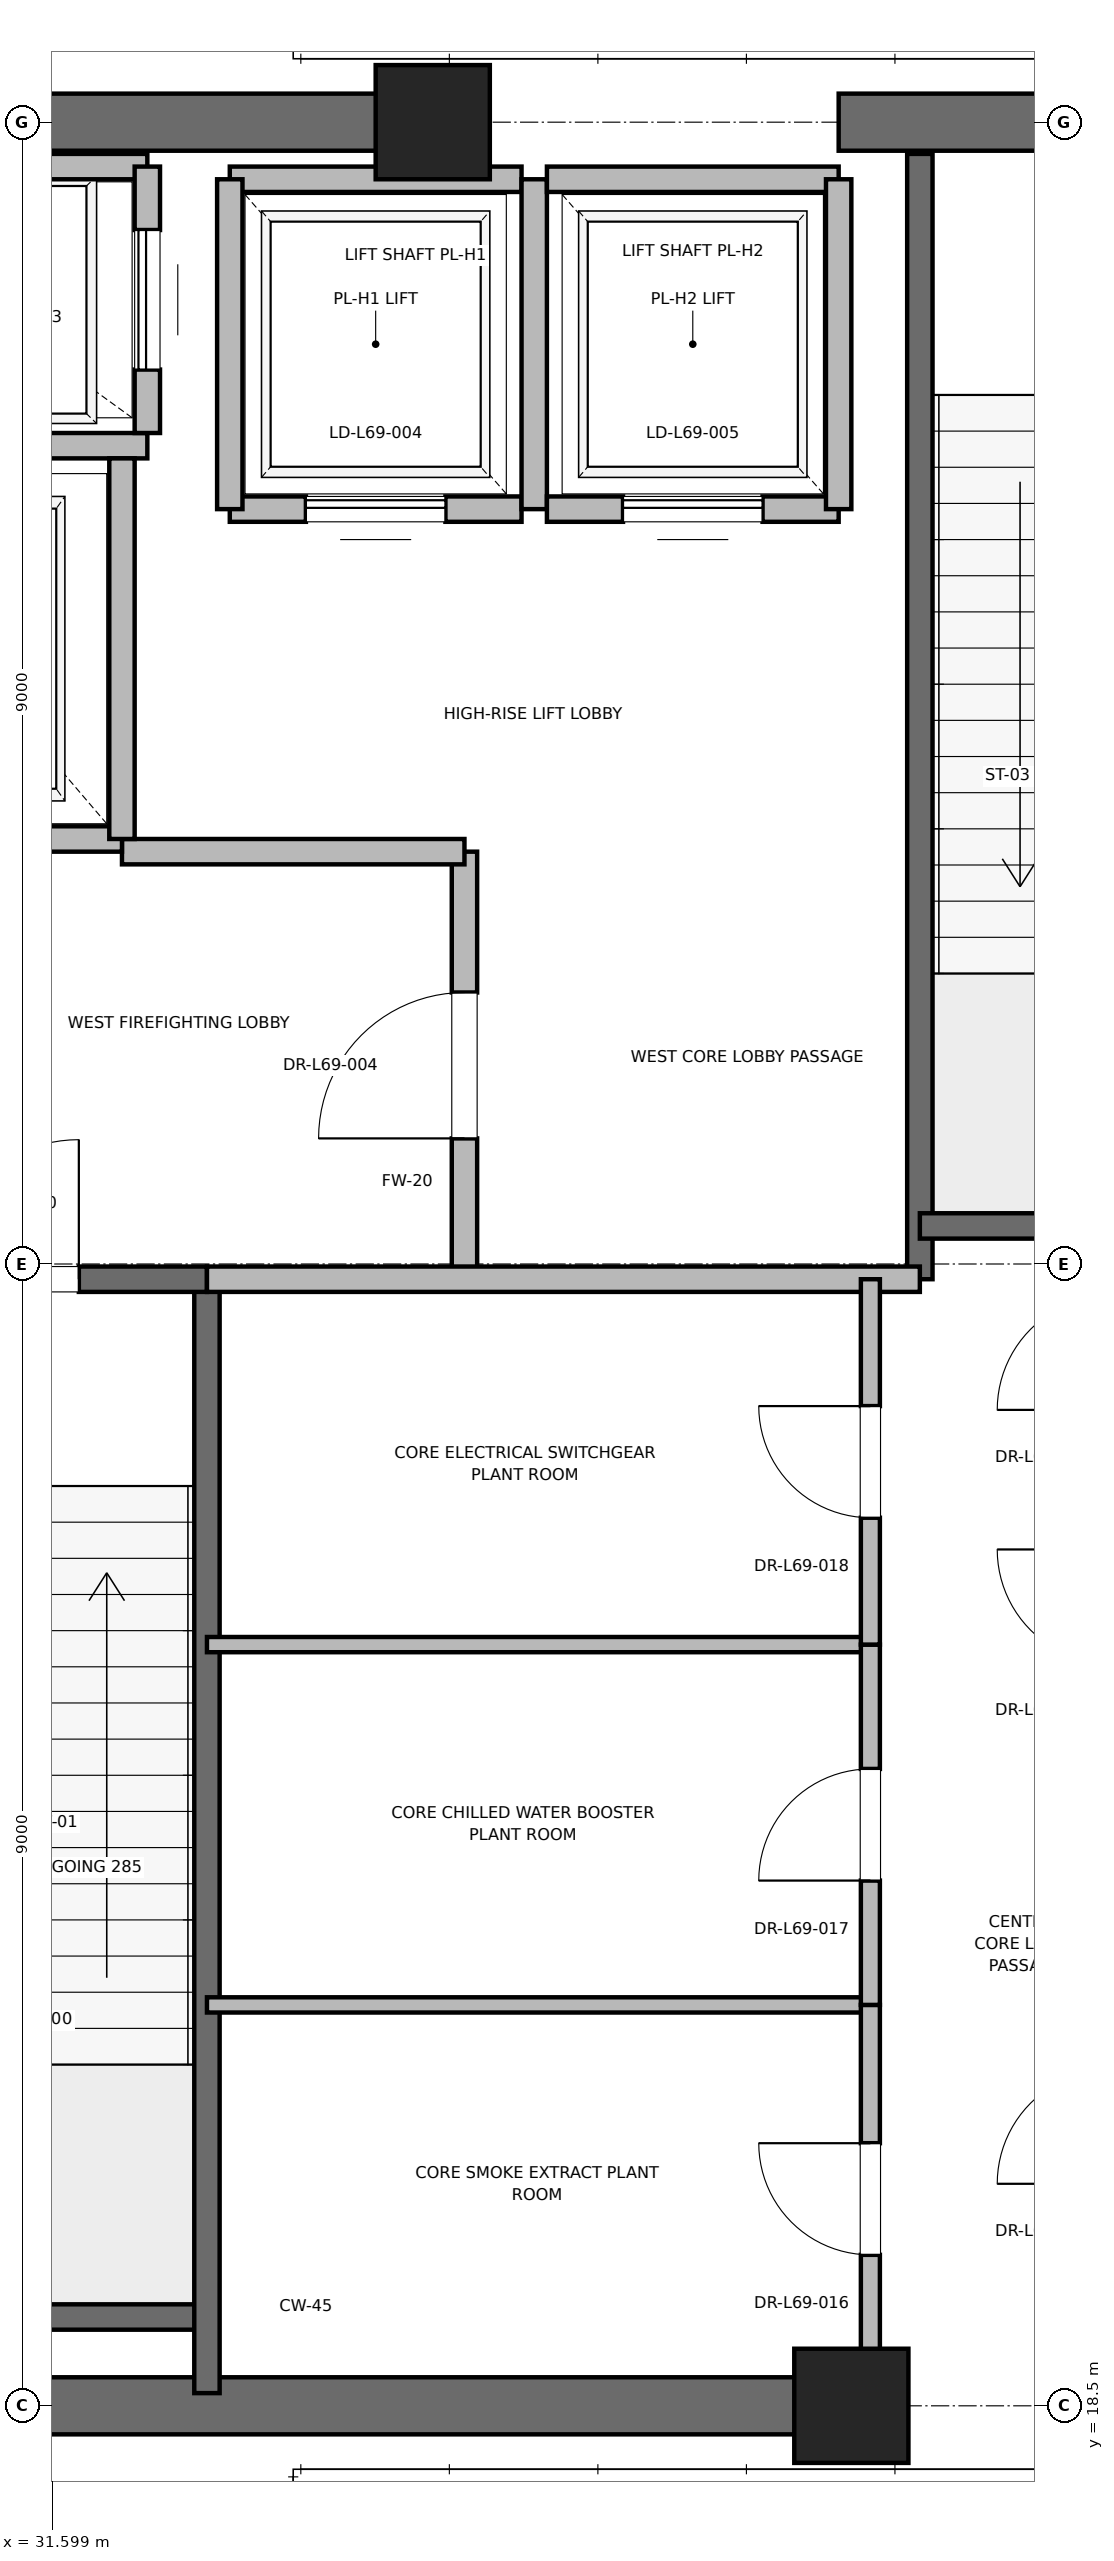
"""IFC4 building model, lengths in metres.
Left out: names, types, materials, properties, quantities, classifications, styles, units other than length and angle.
Written with IfcOpenShell. Run it as: python <this file> out.ifc"""

import sys

from ifc_helpers import new_model, si_unit, direction, frame, frame_2d, origin, origin_2d, place, context, subcontext, project, spatial, rectangle, extrude, element, fill, save


model = new_model("IFC4")
c1 = context("Model", 3, precision=1e-05, world=origin(), true_north=direction((0.0, 1.0)))
c2 = subcontext(c1, "Body", "Model", "MODEL_VIEW")
j1 = project(units=[si_unit("LENGTHUNIT", "METRE"), si_unit("PLANEANGLEUNIT", "RADIAN")], contexts=[c1])
p1 = place(None, origin())
s1 = spatial("IfcSite", under=j1, at=p1, CompositionType="ELEMENT")
p2 = place(p1, origin())
s2 = spatial("IfcBuilding", under=s1, at=p2, CompositionType="ELEMENT")
p3 = place(p2, frame((0.0, 0.0, 295.2)))
s3 = spatial("IfcBuildingStorey", under=s2, at=p3, CompositionType="ELEMENT", Elevation=295.2)
for number, where, z_axis, x_axis in (
    (1, (37.9, 18.5, 0.0), (0.0, 0.0, 1.0), (1.0, 0.0, 0.0)),
    (2, (34.6, 36.5, 0.0), (0.0, 0.0, 1.0), (1.0, 0.0, 0.0)),
):
    element("IfcColumn", number, at=place(p3, frame(where, z_axis=z_axis, x_axis=x_axis)), inside=s3, PredefinedType="PILASTER", context=c2, shape_type="SweptSolid", body=[
        extrude(rectangle(XDim=0.9, YDim=0.9, at=origin_2d()), origin(), (0.0, 0.0, 1.0), 5.8),
    ])
p4 = place(p3, frame((29.0, 18.5, 0.0), z_axis=(0.0, 0.0, 1.0), x_axis=(1.0, 0.0, 0.0)))
e3 = element("IfcWall", 3, at=p4, inside=s3, PredefinedType="SHEAR", context=c2, shape_type="SweptSolid", body=[
    extrude(rectangle(XDim=9.2, YDim=0.45, at=frame_2d((4.6, 0.0))), origin(), (0.0, 0.0, 1.0), 5.5),
])
p5 = place(p3, frame((29.0, 36.5, 0.0), z_axis=(0.0, 0.0, 1.0), x_axis=(1.0, 0.0, 0.0)))
e4 = element("IfcWall", 4, at=p5, inside=s3, PredefinedType="SHEAR", context=c2, shape_type="SweptSolid", body=[
    extrude(rectangle(XDim=5.8, YDim=0.45, at=frame_2d((2.9, 0.0))), origin(), (0.0, 0.0, 1.0), 5.5),
])
p6 = place(p3, frame((37.8, 36.5, 0.0), z_axis=(0.0, 0.0, 1.0), x_axis=(1.0, 0.0, 0.0)))
e5 = element("IfcWall", 5, at=p6, inside=s3, PredefinedType="SHEAR", context=c2, shape_type="SweptSolid", body=[
    extrude(rectangle(XDim=4.4, YDim=0.45, at=frame_2d((2.2, 0.0))), origin(), (0.0, 0.0, 1.0), 5.5),
])
p7 = place(p6, frame((1.65, 0.0, 0.0)))
e6 = element("IfcOpeningElement", 6, at=p7, cuts=e5, PredefinedType="OPENING", context=c2, shape_type="SweptSolid", body=[
    extrude(rectangle(XDim=1.1, YDim=2.15, at=frame_2d((0.55, 1.075))), frame((0.0, 0.225, 0.0), z_axis=(0.0, -1.0, 0.0), x_axis=(1.0, 0.0, 0.0)), (0.0, 0.0, 1.0), 0.45),
])
p8 = place(p3, frame((29.7, 19.2, 0.0), z_axis=(0.0, 0.0, 1.0), x_axis=(1.0, 0.0, 0.0)))
e7 = element("IfcWall", 7, at=p8, inside=s3, PredefinedType="SOLIDWALL", context=c2, shape_type="SweptSolid", body=[
    extrude(rectangle(XDim=3.12, YDim=0.2, at=frame_2d((1.56, 0.0))), origin(), (0.0, 0.0, 1.0), 5.5),
])
p9 = place(p3, frame((32.82, 18.6, 0.0), z_axis=(0.0, 0.0, 1.0), x_axis=(0.0, 1.0, 0.0)))
e8 = element("IfcWall", 8, at=p9, inside=s3, PredefinedType="SOLIDWALL", context=c2, shape_type="SweptSolid", body=[
    extrude(rectangle(XDim=8.78, YDim=0.2, at=frame_2d((4.39, 0.0))), origin(), (0.0, 0.0, 1.0), 5.5),
])
p10 = place(p3, frame((29.7, 27.38, 0.0), z_axis=(0.0, 0.0, 1.0), x_axis=(1.0, 0.0, 0.0)))
e9 = element("IfcWall", 9, at=p10, inside=s3, PredefinedType="SOLIDWALL", context=c2, shape_type="SweptSolid", body=[
    extrude(rectangle(XDim=3.12, YDim=0.2, at=frame_2d((1.56, 0.0))), origin(), (0.0, 0.0, 1.0), 5.5),
])
p11 = place(p10, frame((1.01, 0.0, 0.0)))
e10 = element("IfcOpeningElement", 10, at=p11, cuts=e9, PredefinedType="OPENING", context=c2, shape_type="SweptSolid", body=[
    extrude(rectangle(XDim=1.1, YDim=2.15, at=frame_2d((0.55, 1.075))), frame((0.0, 0.1, 0.0), z_axis=(0.0, -1.0, 0.0), x_axis=(1.0, 0.0, 0.0)), (0.0, 0.0, 1.0), 0.2),
])
p12 = place(p3, frame((38.44, 27.38, 0.0), z_axis=(0.0, 0.0, 1.0), x_axis=(0.0, 1.0, 0.0)))
e11 = element("IfcWall", 11, at=p12, inside=s3, PredefinedType="SOLIDWALL", context=c2, shape_type="SweptSolid", body=[
    extrude(rectangle(XDim=8.87, YDim=0.2, at=frame_2d((4.435, 0.0))), origin(), (0.0, 0.0, 1.0), 5.5),
])
p13 = place(p3, frame((38.44, 27.8, 0.0), z_axis=(0.0, 0.0, 1.0), x_axis=(1.0, 0.0, 0.0)))
e12 = element("IfcWall", 12, at=p13, inside=s3, PredefinedType="SOLIDWALL", context=c2, shape_type="SweptSolid", body=[
    extrude(rectangle(XDim=3.32, YDim=0.2, at=frame_2d((1.66, 0.0))), origin(), (0.0, 0.0, 1.0), 5.5),
])
p14 = place(p3, frame((34.85, 27.38, 0.0), z_axis=(0.0, 0.0, 1.0), x_axis=(0.0, 1.0, 0.0)))
e13 = element("IfcWall", 13, at=p14, inside=s3, PredefinedType="PARTITIONING", context=c2, shape_type="SweptSolid", body=[
    extrude(rectangle(XDim=3.37, YDim=0.2, at=frame_2d((1.685, 0.0))), origin(), (0.0, 0.0, 1.0), 5.5),
])
p15 = place(p14, frame((1.11, 0.0, 0.0)))
e14 = element("IfcOpeningElement", 14, at=p15, cuts=e13, PredefinedType="OPENING", context=c2, shape_type="SweptSolid", body=[
    extrude(rectangle(XDim=1.15, YDim=2.2, at=frame_2d((0.575, 1.1))), frame((0.0, 0.1, 0.0), z_axis=(0.0, -1.0, 0.0), x_axis=(1.0, 0.0, 0.0)), (0.0, 0.0, 1.0), 0.2),
])
p16 = place(p3, frame((32.82, 27.38, 0.0), z_axis=(0.0, 0.0, 1.0), x_axis=(1.0, 0.0, 0.0)))
e15 = element("IfcWall", 15, at=p16, inside=s3, PredefinedType="PARTITIONING", context=c2, shape_type="SweptSolid", body=[
    extrude(rectangle(XDim=5.62, YDim=0.2, at=frame_2d((2.81, 0.0))), origin(), (0.0, 0.0, 1.0), 5.5),
])
p17 = place(p3, frame((32.15, 30.75, 0.0), z_axis=(0.0, 0.0, 1.0), x_axis=(1.0, 0.0, 0.0)))
e16 = element("IfcWall", 16, at=p17, inside=s3, PredefinedType="PARTITIONING", context=c2, shape_type="SweptSolid", body=[
    extrude(rectangle(XDim=2.7, YDim=0.2, at=frame_2d((1.35, 0.0))), origin(), (0.0, 0.0, 1.0), 5.5),
])
p18 = place(p3, frame((29.55, 30.85, 0.0), z_axis=(0.0, 0.0, 1.0), x_axis=(1.0, 0.0, 0.0)))
e17 = element("IfcWall", 17, at=p18, inside=s3, PredefinedType="SOLIDWALL", context=c2, shape_type="SweptSolid", body=[
    extrude(rectangle(XDim=2.6, YDim=0.2, at=frame_2d((1.3, 0.0))), origin(), (0.0, 0.0, 1.0), 4.58),
])
p19 = place(p18, frame((0.75, 0.0, 0.0)))
e18 = element("IfcOpeningElement", 18, at=p19, cuts=e17, PredefinedType="OPENING", context=c2, shape_type="SweptSolid", body=[
    extrude(rectangle(XDim=1.1, YDim=2.2, at=frame_2d((0.55, 1.1))), frame((0.0, 0.1, 0.0), z_axis=(0.0, -1.0, 0.0), x_axis=(1.0, 0.0, 0.0)), (0.0, 0.0, 1.0), 0.2),
])
p20 = place(p3, frame((29.55, 33.95, 0.0), z_axis=(0.0, 0.0, 1.0), x_axis=(1.0, 0.0, 0.0)))
e19 = element("IfcWall", 19, at=p20, inside=s3, PredefinedType="SOLIDWALL", context=c2, shape_type="SweptSolid", body=[
    extrude(rectangle(XDim=2.8, YDim=0.2, at=frame_2d((1.4, 0.0))), origin(), (0.0, 0.0, 1.0), 5.5),
])
p21 = place(p3, frame((32.15, 30.85, 0.0), z_axis=(0.0, 0.0, 1.0), x_axis=(0.0, 1.0, 0.0)))
e20 = element("IfcWall", 20, at=p21, inside=s3, PredefinedType="SOLIDWALL", context=c2, shape_type="SweptSolid", body=[
    extrude(rectangle(XDim=3.0, YDim=0.2, at=frame_2d((1.5, 0.0))), origin(), (0.0, 0.0, 1.0), 5.5),
])
p22 = place(p3, frame((32.35, 36.15, 0.0), z_axis=(0.0, 0.0, 1.0), x_axis=(-1.0, 0.0, 0.0)))
e21 = element("IfcWall", 21, at=p22, inside=s3, PredefinedType="SOLIDWALL", context=c2, shape_type="SweptSolid", body=[
    extrude(rectangle(XDim=2.8, YDim=0.2, at=frame_2d((1.4, 0.0))), origin(), (0.0, 0.0, 1.0), 4.553),
])
p23 = place(p3, frame((32.35, 34.05, 0.0), z_axis=(0.0, 0.0, 1.0), x_axis=(0.0, 1.0, 0.0)))
e22 = element("IfcWall", 22, at=p23, inside=s3, PredefinedType="SOLIDWALL", context=c2, shape_type="SweptSolid", body=[
    extrude(rectangle(XDim=2.1, YDim=0.2, at=frame_2d((1.05, 0.0))), origin(), (0.0, 0.0, 1.0), 5.5),
])
p24 = place(p23, frame((0.5, 0.0, 0.0)))
e23 = element("IfcOpeningElement", 23, at=p24, cuts=e22, PredefinedType="OPENING", context=c2, shape_type="SweptSolid", body=[
    extrude(rectangle(XDim=1.1, YDim=2.2, at=frame_2d((0.55, 1.1))), frame((0.0, 0.1, 0.0), z_axis=(0.0, -1.0, 0.0), x_axis=(1.0, 0.0, 0.0)), (0.0, 0.0, 1.0), 0.2),
])
p25 = place(p3, frame((33.0, 33.45, 0.0), z_axis=(0.0, 0.0, 1.0), x_axis=(1.0, 0.0, 0.0)))
e24 = element("IfcWall", 24, at=p25, inside=s3, PredefinedType="SOLIDWALL", context=c2, shape_type="SweptSolid", body=[
    extrude(rectangle(XDim=2.3, YDim=0.2, at=frame_2d((1.15, 0.0))), origin(), (0.0, 0.0, 1.0), 5.5),
])
p26 = place(p25, frame((0.6, 0.0, 0.0)))
e25 = element("IfcOpeningElement", 25, at=p26, cuts=e24, PredefinedType="OPENING", context=c2, shape_type="SweptSolid", body=[
    extrude(rectangle(XDim=1.1, YDim=2.2, at=frame_2d((0.55, 1.1))), frame((0.0, 0.1, 0.0), z_axis=(0.0, -1.0, 0.0), x_axis=(1.0, 0.0, 0.0)), (0.0, 0.0, 1.0), 0.2),
])
p27 = place(p3, frame((35.3, 36.05, 0.0), z_axis=(0.0, 0.0, 1.0), x_axis=(-1.0, 0.0, 0.0)))
e26 = element("IfcWall", 26, at=p27, inside=s3, PredefinedType="SOLIDWALL", context=c2, shape_type="SweptSolid", body=[
    extrude(rectangle(XDim=2.3, YDim=0.2, at=frame_2d((1.15, 0.0))), origin(), (0.0, 0.0, 1.0), 4.58),
])
p28 = place(p3, frame((33.0, 36.05, 0.0), z_axis=(0.0, 0.0, 1.0), x_axis=(0.0, -1.0, 0.0)))
e27 = element("IfcWall", 27, at=p28, inside=s3, PredefinedType="SOLIDWALL", context=c2, shape_type="SweptSolid", body=[
    extrude(rectangle(XDim=2.6, YDim=0.2, at=frame_2d((1.3, 0.0))), origin(), (0.0, 0.0, 1.0), 5.5),
])
p29 = place(p3, frame((35.4, 33.45, 0.0), z_axis=(0.0, 0.0, 1.0), x_axis=(0.0, 1.0, 0.0)))
e28 = element("IfcWall", 28, at=p29, inside=s3, PredefinedType="SOLIDWALL", context=c2, shape_type="SweptSolid", body=[
    extrude(rectangle(XDim=2.6, YDim=0.2, at=frame_2d((1.3, 0.0))), origin(), (0.0, 0.0, 1.0), 4.58),
])
p30 = place(p3, frame((35.5, 33.45, 0.0), z_axis=(0.0, 0.0, 1.0), x_axis=(1.0, 0.0, 0.0)))
e29 = element("IfcWall", 29, at=p30, inside=s3, PredefinedType="SOLIDWALL", context=c2, shape_type="SweptSolid", body=[
    extrude(rectangle(XDim=2.3, YDim=0.2, at=frame_2d((1.15, 0.0))), origin(), (0.0, 0.0, 1.0), 5.5),
])
p31 = place(p30, frame((0.6, 0.0, 0.0)))
e30 = element("IfcOpeningElement", 30, at=p31, cuts=e29, PredefinedType="OPENING", context=c2, shape_type="SweptSolid", body=[
    extrude(rectangle(XDim=1.1, YDim=2.2, at=frame_2d((0.55, 1.1))), frame((0.0, 0.1, 0.0), z_axis=(0.0, -1.0, 0.0), x_axis=(1.0, 0.0, 0.0)), (0.0, 0.0, 1.0), 0.2),
])
p32 = place(p3, frame((37.8, 36.05, 0.0), z_axis=(0.0, 0.0, 1.0), x_axis=(-1.0, 0.0, 0.0)))
e31 = element("IfcWall", 31, at=p32, inside=s3, PredefinedType="SOLIDWALL", context=c2, shape_type="SweptSolid", body=[
    extrude(rectangle(XDim=2.3, YDim=0.2, at=frame_2d((1.15, 0.0))), origin(), (0.0, 0.0, 1.0), 4.58),
])
p33 = place(p3, frame((37.8, 33.45, 0.0), z_axis=(0.0, 0.0, 1.0), x_axis=(0.0, 1.0, 0.0)))
e32 = element("IfcWall", 32, at=p33, inside=s3, PredefinedType="SOLIDWALL", context=c2, shape_type="SweptSolid", body=[
    extrude(rectangle(XDim=2.6, YDim=0.2, at=frame_2d((1.3, 0.0))), origin(), (0.0, 0.0, 1.0), 4.58),
])
for number, where, z_axis, x_axis in (
    (33, (32.82, 21.66, 0.0), (0.0, 0.0, 1.0), (1.0, 0.0, 0.0)),
    (34, (32.82, 24.5, 0.0), (0.0, 0.0, 1.0), (1.0, 0.0, 0.0)),
):
    element("IfcWall", number, at=place(p3, frame(where, z_axis=z_axis, x_axis=x_axis)), inside=s3, PredefinedType="PARTITIONING", context=c2, shape_type="SweptSolid", body=[
        extrude(rectangle(XDim=5.23, YDim=0.12, at=frame_2d((2.615, 0.0))), origin(), (0.0, 0.0, 1.0), 2.85),
    ])
p34 = place(p3, frame((38.05, 18.6, 0.0), z_axis=(0.0, 0.0, 1.0), x_axis=(0.0, 1.0, 0.0)))
e35 = element("IfcWall", 35, at=p34, inside=s3, PredefinedType="PARTITIONING", context=c2, shape_type="SweptSolid", body=[
    extrude(rectangle(XDim=3.06, YDim=0.15, at=frame_2d((1.53, 0.0))), origin(), (0.0, 0.0, 1.0), 2.85),
])
p35 = place(p34, frame((1.09, 0.0, 0.0)))
e36 = element("IfcOpeningElement", 36, at=p35, cuts=e35, PredefinedType="OPENING", context=c2, shape_type="SweptSolid", body=[
    extrude(rectangle(XDim=0.88, YDim=2.1, at=frame_2d((0.44, 1.05))), frame((0.0, 0.075, 0.0), z_axis=(0.0, -1.0, 0.0), x_axis=(1.0, 0.0, 0.0)), (0.0, 0.0, 1.0), 0.15),
])
p36 = place(p3, frame((38.05, 21.66, 0.0), z_axis=(0.0, 0.0, 1.0), x_axis=(0.0, 1.0, 0.0)))
e37 = element("IfcWall", 37, at=p36, inside=s3, PredefinedType="PARTITIONING", context=c2, shape_type="SweptSolid", body=[
    extrude(rectangle(XDim=2.84, YDim=0.15, at=frame_2d((1.42, 0.0))), origin(), (0.0, 0.0, 1.0), 2.85),
])
p37 = place(p36, frame((0.98, 0.0, 0.0)))
e38 = element("IfcOpeningElement", 38, at=p37, cuts=e37, PredefinedType="OPENING", context=c2, shape_type="SweptSolid", body=[
    extrude(rectangle(XDim=0.88, YDim=2.1, at=frame_2d((0.44, 1.05))), frame((0.0, 0.075, 0.0), z_axis=(0.0, -1.0, 0.0), x_axis=(1.0, 0.0, 0.0)), (0.0, 0.0, 1.0), 0.15),
])
p38 = place(p3, frame((38.05, 24.5, 0.0), z_axis=(0.0, 0.0, 1.0), x_axis=(0.0, 1.0, 0.0)))
e39 = element("IfcWall", 39, at=p38, inside=s3, PredefinedType="PARTITIONING", context=c2, shape_type="SweptSolid", body=[
    extrude(rectangle(XDim=2.88, YDim=0.15, at=frame_2d((1.44, 0.0))), origin(), (0.0, 0.0, 1.0), 2.85),
])
p39 = place(p38, frame((1.0, 0.0, 0.0)))
e40 = element("IfcOpeningElement", 40, at=p39, cuts=e39, PredefinedType="OPENING", context=c2, shape_type="SweptSolid", body=[
    extrude(rectangle(XDim=0.88, YDim=2.1, at=frame_2d((0.44, 1.05))), frame((0.0, 0.075, 0.0), z_axis=(0.0, -1.0, 0.0), x_axis=(1.0, 0.0, 0.0)), (0.0, 0.0, 1.0), 0.15),
])
p40 = place(p11, origin())
e41 = element("IfcDoor", 41, at=p40, inside=s3, OperationType="SINGLE_SWING_RIGHT", PredefinedType="DOOR", context=c2, shape_type="SweptSolid", body=[
    extrude(rectangle(XDim=1.1, YDim=2.15, at=frame_2d((0.55, 1.075))), frame((0.0, 0.025, 0.0), z_axis=(0.0, -1.0, 0.0), x_axis=(1.0, 0.0, 0.0)), (0.0, 0.0, 1.0), 0.05),
])
fill(e10, e41)
p41 = place(p15, origin())
e42 = element("IfcDoor", 42, at=p41, inside=s3, OperationType="SINGLE_SWING_LEFT", PredefinedType="DOOR", context=c2, shape_type="SweptSolid", body=[
    extrude(rectangle(XDim=1.15, YDim=2.2, at=frame_2d((0.575, 1.1))), frame((0.0, 0.025, 0.0), z_axis=(0.0, -1.0, 0.0), x_axis=(1.0, 0.0, 0.0)), (0.0, 0.0, 1.0), 0.05),
])
fill(e14, e42)
p42 = place(p24, origin())
e43 = element("IfcDoor", 43, at=p42, inside=s3, OperationType="SLIDING_TO_RIGHT", PredefinedType="DOOR", context=c2, shape_type="SweptSolid", body=[
    extrude(rectangle(XDim=1.1, YDim=2.2, at=frame_2d((0.55, 1.1))), frame((0.0, 0.025, 0.0), z_axis=(0.0, -1.0, 0.0), x_axis=(1.0, 0.0, 0.0)), (0.0, 0.0, 1.0), 0.05),
])
fill(e23, e43)
p43 = place(p26, origin())
e44 = element("IfcDoor", 44, at=p43, inside=s3, OperationType="SLIDING_TO_RIGHT", PredefinedType="DOOR", context=c2, shape_type="SweptSolid", body=[
    extrude(rectangle(XDim=1.1, YDim=2.2, at=frame_2d((0.55, 1.1))), frame((0.0, 0.025, 0.0), z_axis=(0.0, -1.0, 0.0), x_axis=(1.0, 0.0, 0.0)), (0.0, 0.0, 1.0), 0.05),
])
fill(e25, e44)
p44 = place(p31, origin())
e45 = element("IfcDoor", 45, at=p44, inside=s3, OperationType="SLIDING_TO_RIGHT", PredefinedType="DOOR", context=c2, shape_type="SweptSolid", body=[
    extrude(rectangle(XDim=1.1, YDim=2.2, at=frame_2d((0.55, 1.1))), frame((0.0, 0.025, 0.0), z_axis=(0.0, -1.0, 0.0), x_axis=(1.0, 0.0, 0.0)), (0.0, 0.0, 1.0), 0.05),
])
fill(e30, e45)
p45 = place(p35, origin())
e46 = element("IfcDoor", 46, at=p45, inside=s3, OperationType="SINGLE_SWING_RIGHT", PredefinedType="DOOR", context=c2, shape_type="SweptSolid", body=[
    extrude(rectangle(XDim=0.88, YDim=2.1, at=frame_2d((0.44, 1.05))), frame((0.0, 0.025, 0.0), z_axis=(0.0, -1.0, 0.0), x_axis=(1.0, 0.0, 0.0)), (0.0, 0.0, 1.0), 0.05),
])
fill(e36, e46)
p46 = place(p37, origin())
e47 = element("IfcDoor", 47, at=p46, inside=s3, OperationType="SINGLE_SWING_LEFT", PredefinedType="DOOR", context=c2, shape_type="SweptSolid", body=[
    extrude(rectangle(XDim=0.88, YDim=2.1, at=frame_2d((0.44, 1.05))), frame((0.0, 0.025, 0.0), z_axis=(0.0, -1.0, 0.0), x_axis=(1.0, 0.0, 0.0)), (0.0, 0.0, 1.0), 0.05),
])
fill(e38, e47)
p47 = place(p39, origin())
e48 = element("IfcDoor", 48, at=p47, inside=s3, OperationType="SINGLE_SWING_RIGHT", PredefinedType="DOOR", context=c2, shape_type="SweptSolid", body=[
    extrude(rectangle(XDim=0.88, YDim=2.1, at=frame_2d((0.44, 1.05))), frame((0.0, 0.025, 0.0), z_axis=(0.0, -1.0, 0.0), x_axis=(1.0, 0.0, 0.0)), (0.0, 0.0, 1.0), 0.05),
])
fill(e40, e48)
save(model, sys.argv[1])
